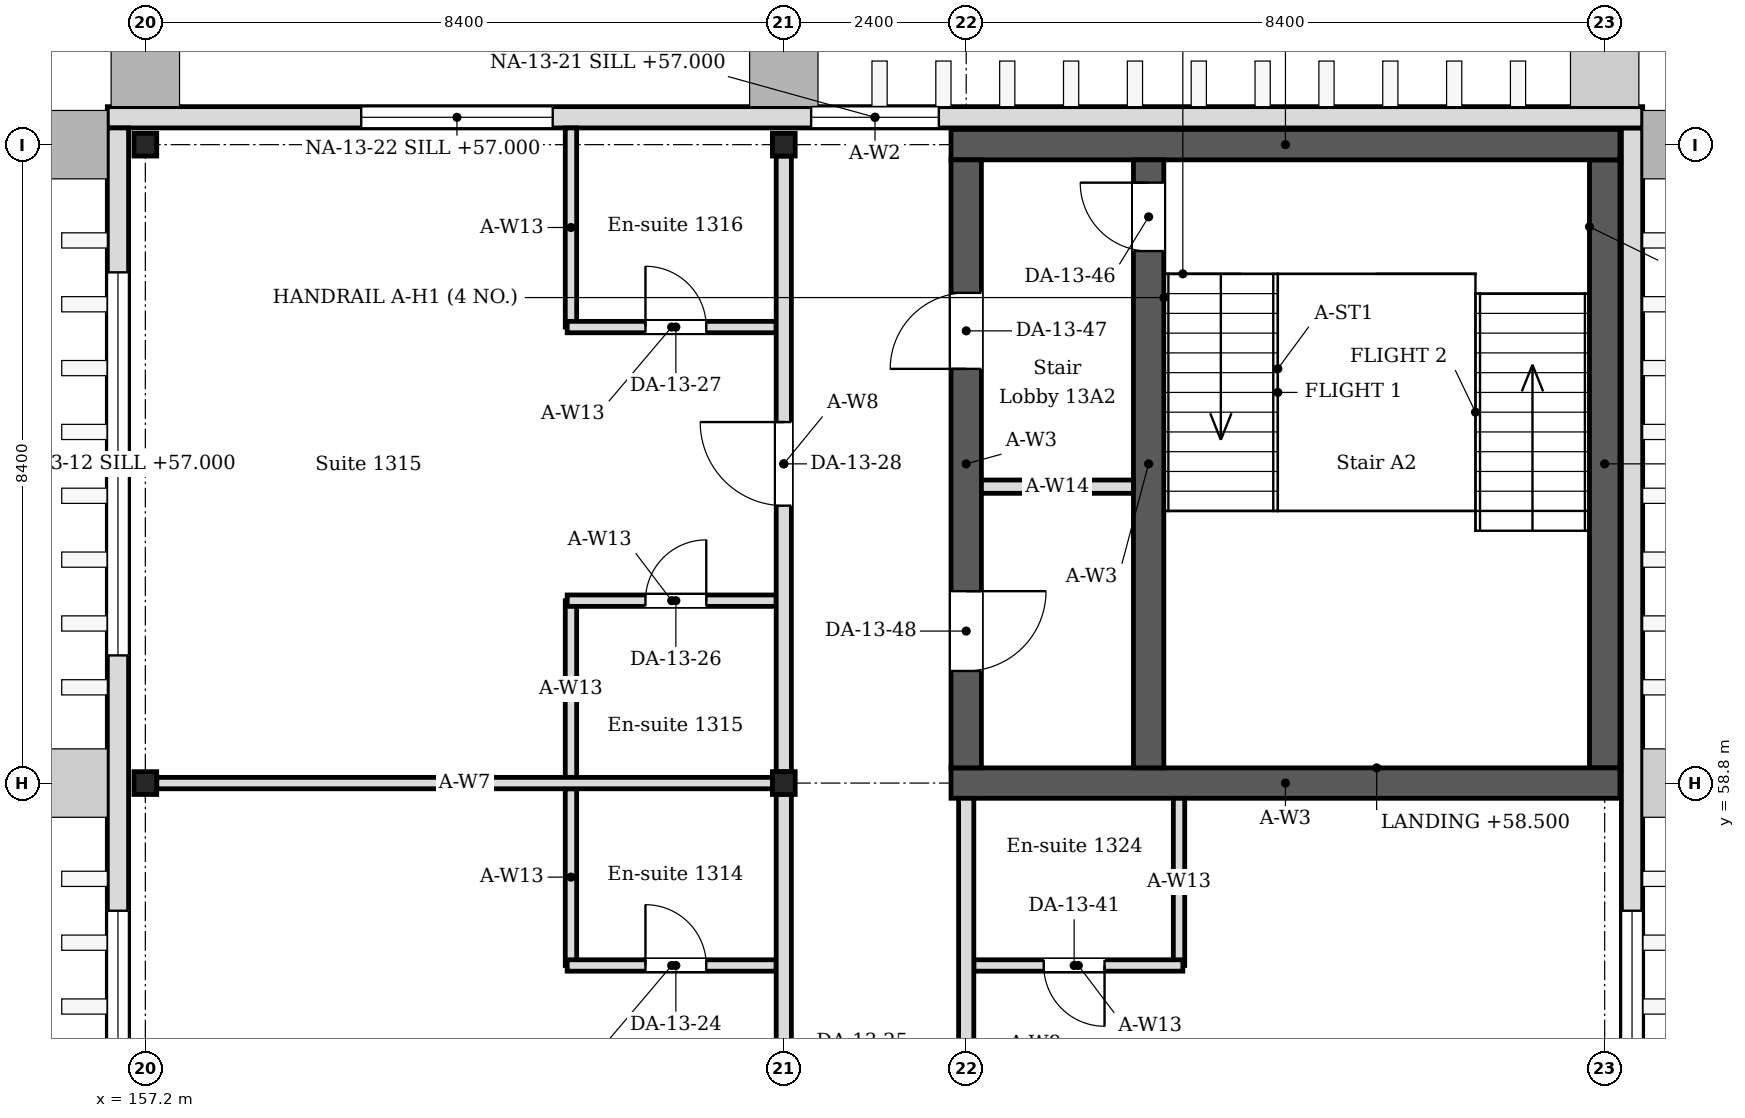
"""IFC4 building model, lengths in metres.
Left out: names, types, materials, properties, quantities, classifications, styles, units other than length and angle.
Written with IfcOpenShell. Run it as: python <this file> out.ifc"""

import sys

from ifc_helpers import new_model, si_unit, direction, frame, frame_2d, origin, origin_2d, place, context, subcontext, project, spatial, rectangle, i_section, extrude, element, fill, save


model = new_model("IFC4")
c1 = context("Model", 3, precision=1e-05, world=origin(), true_north=direction((0.0, 1.0)))
c2 = subcontext(c1, "Body", "Model", "MODEL_VIEW")
j1 = project(units=[si_unit("LENGTHUNIT", "METRE"), si_unit("PLANEANGLEUNIT", "RADIAN")], contexts=[c1])
p1 = place(None, origin())
s1 = spatial("IfcSite", under=j1, at=p1, CompositionType="ELEMENT")
p2 = place(p1, origin())
s2 = spatial("IfcBuilding", under=s1, at=p2, CompositionType="ELEMENT")
p3 = place(p2, frame((0.0, 0.0, 56.4)))
s3 = spatial("IfcBuildingStorey", under=s2, at=p3, CompositionType="ELEMENT", Elevation=56.4)
for number, where, z_axis, x_axis in (
    (1, (157.2, 58.8, 0.0), (0.0, 0.0, 1.0), (1.0, 0.0, 0.0)),
    (2, (157.2, 67.2, 0.0), (0.0, 0.0, 1.0), (1.0, 0.0, 0.0)),
    (3, (165.6, 58.8, 0.0), (0.0, 0.0, 1.0), (1.0, 0.0, 0.0)),
    (4, (165.6, 67.2, 0.0), (0.0, 0.0, 1.0), (1.0, 0.0, 0.0)),
):
    element("IfcColumn", number, at=place(p3, frame(where, z_axis=z_axis, x_axis=x_axis)), inside=s3, PredefinedType="COLUMN", context=c2, shape_type="SweptSolid", body=[
        extrude(i_section(OverallWidth=0.3, OverallDepth=0.3, WebThickness=0.01, FlangeThickness=0.015, FilletRadius=0.013, at=origin_2d()), origin(), (0.0, 0.0, 1.0), 4.2),
    ])
for number, where, z_axis, x_axis in (
    (5, (167.8, 58.8, 0.0), (0.0, 0.0, 1.0), (1.0, 0.0, 0.0)),
    (6, (167.8, 67.2, 0.0), (0.0, 0.0, 1.0), (1.0, 0.0, 0.0)),
):
    element("IfcWall", number, at=place(p3, frame(where, z_axis=z_axis, x_axis=x_axis)), inside=s3, PredefinedType="SOLIDWALL", context=c2, shape_type="SweptSolid", body=[
        extrude(rectangle(XDim=8.8, YDim=0.4, at=frame_2d((4.4, 0.0))), origin(), (0.0, 0.0, 1.0), 4.05),
    ])
p4 = place(p3, frame((168.0, 59.0, 0.0), z_axis=(0.0, 0.0, 1.0), x_axis=(0.0, 1.0, 0.0)))
e7 = element("IfcWall", 7, at=p4, inside=s3, PredefinedType="SOLIDWALL", context=c2, shape_type="SweptSolid", body=[
    extrude(rectangle(XDim=8.0, YDim=0.4, at=frame_2d((4.0, 0.0))), origin(), (0.0, 0.0, 1.0), 4.05),
])
p5 = place(p4, frame((5.25, 0.0, 0.0)))
e8 = element("IfcOpeningElement", 8, at=p5, cuts=e7, PredefinedType="OPENING", context=c2, shape_type="SweptSolid", body=[
    extrude(rectangle(XDim=1.0, YDim=2.1, at=frame_2d((0.5, 1.05))), frame((0.0, 0.21, 0.0), z_axis=(0.0, -1.0, 0.0), x_axis=(1.0, 0.0, 0.0)), (0.0, 0.0, 1.0), 0.42),
])
p6 = place(p4, frame((1.275, 0.0, 0.0)))
e9 = element("IfcOpeningElement", 9, at=p6, cuts=e7, PredefinedType="OPENING", context=c2, shape_type="SweptSolid", body=[
    extrude(rectangle(XDim=1.05, YDim=2.1, at=frame_2d((0.525, 1.05))), frame((0.0, 0.21, 0.0), z_axis=(0.0, -1.0, 0.0), x_axis=(1.0, 0.0, 0.0)), (0.0, 0.0, 1.0), 0.42),
])
p7 = place(p3, frame((176.4, 59.0, 0.0), z_axis=(0.0, 0.0, 1.0), x_axis=(0.0, 1.0, 0.0)))
e10 = element("IfcWall", 10, at=p7, inside=s3, PredefinedType="SOLIDWALL", context=c2, shape_type="SweptSolid", body=[
    extrude(rectangle(XDim=8.0, YDim=0.4, at=frame_2d((4.0, 0.0))), origin(), (0.0, 0.0, 1.0), 4.05),
])
p8 = place(p3, frame((156.84, 41.65, 0.0), z_axis=(0.0, 0.0, 1.0), x_axis=(0.0, 1.0, 0.0)))
e11 = element("IfcWall", 11, at=p8, inside=s3, PredefinedType="SOLIDWALL", context=c2, shape_type="SweptSolid", body=[
    extrude(rectangle(XDim=25.77, YDim=0.28, at=frame_2d((12.885, 0.0))), origin(), (0.0, 0.0, 1.0), 4.05),
])
p9 = place(p8, frame((2.03, 0.0, 0.6)))
e12 = element("IfcOpeningElement", 12, at=p9, cuts=e11, PredefinedType="OPENING", context=c2, shape_type="SweptSolid", body=[
    extrude(rectangle(XDim=5.04, YDim=2.4, at=frame_2d((2.52, 1.2))), frame((0.0, 0.15, 0.0), z_axis=(0.0, -1.0, 0.0), x_axis=(1.0, 0.0, 0.0)), (0.0, 0.0, 1.0), 0.3),
])
p10 = place(p8, frame((10.43, 0.0, 0.6)))
e13 = element("IfcOpeningElement", 13, at=p10, cuts=e11, PredefinedType="OPENING", context=c2, shape_type="SweptSolid", body=[
    extrude(rectangle(XDim=5.04, YDim=2.4, at=frame_2d((2.52, 1.2))), frame((0.0, 0.15, 0.0), z_axis=(0.0, -1.0, 0.0), x_axis=(1.0, 0.0, 0.0)), (0.0, 0.0, 1.0), 0.3),
])
p11 = place(p8, frame((18.83, 0.0, 0.6)))
e14 = element("IfcOpeningElement", 14, at=p11, cuts=e11, PredefinedType="OPENING", context=c2, shape_type="SweptSolid", body=[
    extrude(rectangle(XDim=5.04, YDim=2.4, at=frame_2d((2.52, 1.2))), frame((0.0, 0.15, 0.0), z_axis=(0.0, -1.0, 0.0), x_axis=(1.0, 0.0, 0.0)), (0.0, 0.0, 1.0), 0.3),
])
p12 = place(p3, frame((176.76, 24.85, 0.0), z_axis=(0.0, 0.0, 1.0), x_axis=(0.0, 1.0, 0.0)))
e15 = element("IfcWall", 15, at=p12, inside=s3, PredefinedType="SOLIDWALL", context=c2, shape_type="SweptSolid", body=[
    extrude(rectangle(XDim=42.57, YDim=0.28, at=frame_2d((21.285, 0.0))), origin(), (0.0, 0.0, 1.0), 4.05),
])
p13 = place(p12, frame((18.83, 0.0, 0.6)))
e16 = element("IfcOpeningElement", 16, at=p13, cuts=e15, PredefinedType="OPENING", context=c2, shape_type="SweptSolid", body=[
    extrude(rectangle(XDim=5.04, YDim=2.4, at=frame_2d((2.52, 1.2))), frame((0.0, 0.15, 0.0), z_axis=(0.0, -1.0, 0.0), x_axis=(1.0, 0.0, 0.0)), (0.0, 0.0, 1.0), 0.3),
])
p14 = place(p12, frame((27.23, 0.0, 0.6)))
e17 = element("IfcOpeningElement", 17, at=p14, cuts=e15, PredefinedType="OPENING", context=c2, shape_type="SweptSolid", body=[
    extrude(rectangle(XDim=5.04, YDim=2.4, at=frame_2d((2.52, 1.2))), frame((0.0, 0.15, 0.0), z_axis=(0.0, -1.0, 0.0), x_axis=(1.0, 0.0, 0.0)), (0.0, 0.0, 1.0), 0.3),
])
p15 = place(p3, frame((156.7, 67.56, 0.0), z_axis=(0.0, 0.0, 1.0), x_axis=(1.0, 0.0, 0.0)))
e18 = element("IfcWall", 18, at=p15, inside=s3, PredefinedType="SOLIDWALL", context=c2, shape_type="SweptSolid", body=[
    extrude(rectangle(XDim=20.2, YDim=0.28, at=frame_2d((10.1, 0.0))), origin(), (0.0, 0.0, 1.0), 4.05),
])
p16 = place(p15, frame((9.26, 0.0, 0.6)))
e19 = element("IfcOpeningElement", 19, at=p16, cuts=e18, PredefinedType="OPENING", context=c2, shape_type="SweptSolid", body=[
    extrude(rectangle(XDim=1.68, YDim=2.4, at=frame_2d((0.84, 1.2))), frame((0.0, 0.15, 0.0), z_axis=(0.0, -1.0, 0.0), x_axis=(1.0, 0.0, 0.0)), (0.0, 0.0, 1.0), 0.3),
])
p17 = place(p15, frame((3.34, 0.0, 0.6)))
e20 = element("IfcOpeningElement", 20, at=p17, cuts=e18, PredefinedType="OPENING", context=c2, shape_type="SweptSolid", body=[
    extrude(rectangle(XDim=2.52, YDim=2.4, at=frame_2d((1.26, 1.2))), frame((0.0, 0.15, 0.0), z_axis=(0.0, -1.0, 0.0), x_axis=(1.0, 0.0, 0.0)), (0.0, 0.0, 1.0), 0.3),
])
p18 = place(p3, frame((162.8, 56.4, 0.0), z_axis=(0.0, 0.0, 1.0), x_axis=(0.0, 1.0, 0.0)))
e21 = element("IfcWall", 21, at=p18, inside=s3, PredefinedType="PARTITIONING", context=c2, shape_type="SweptSolid", body=[
    extrude(rectangle(XDim=2.325, YDim=0.15, at=frame_2d((1.163, 0.0))), origin(), (0.0, 0.0, 1.0), 4.05),
])
p19 = place(p3, frame((162.75, 56.4, 0.0), z_axis=(0.0, 0.0, 1.0), x_axis=(1.0, 0.0, 0.0)))
e22 = element("IfcWall", 22, at=p19, inside=s3, PredefinedType="PARTITIONING", context=c2, shape_type="SweptSolid", body=[
    extrude(rectangle(XDim=2.75, YDim=0.15, at=frame_2d((1.375, 0.0))), origin(), (0.0, 0.0, 1.0), 4.05),
])
p20 = place(p19, frame((1.03, 0.0, 0.0)))
e23 = element("IfcOpeningElement", 23, at=p20, cuts=e22, PredefinedType="OPENING", context=c2, shape_type="SweptSolid", body=[
    extrude(rectangle(XDim=0.8, YDim=2.1, at=frame_2d((0.4, 1.05))), frame((0.0, 0.085, 0.0), z_axis=(0.0, -1.0, 0.0), x_axis=(1.0, 0.0, 0.0)), (0.0, 0.0, 1.0), 0.17),
])
p21 = place(p3, frame((162.8, 58.875, 0.0), z_axis=(0.0, 0.0, 1.0), x_axis=(0.0, 1.0, 0.0)))
e24 = element("IfcWall", 24, at=p21, inside=s3, PredefinedType="PARTITIONING", context=c2, shape_type="SweptSolid", body=[
    extrude(rectangle(XDim=2.325, YDim=0.15, at=frame_2d((1.163, 0.0))), origin(), (0.0, 0.0, 1.0), 4.05),
])
p22 = place(p3, frame((162.75, 61.2, 0.0), z_axis=(0.0, 0.0, 1.0), x_axis=(1.0, 0.0, 0.0)))
e25 = element("IfcWall", 25, at=p22, inside=s3, PredefinedType="PARTITIONING", context=c2, shape_type="SweptSolid", body=[
    extrude(rectangle(XDim=2.75, YDim=0.15, at=frame_2d((1.375, 0.0))), origin(), (0.0, 0.0, 1.0), 4.05),
])
p23 = place(p22, frame((1.03, 0.0, 0.0)))
e26 = element("IfcOpeningElement", 26, at=p23, cuts=e25, PredefinedType="OPENING", context=c2, shape_type="SweptSolid", body=[
    extrude(rectangle(XDim=0.8, YDim=2.1, at=frame_2d((0.4, 1.05))), frame((0.0, 0.085, 0.0), z_axis=(0.0, -1.0, 0.0), x_axis=(1.0, 0.0, 0.0)), (0.0, 0.0, 1.0), 0.17),
])
p24 = place(p3, frame((162.8, 64.8, 0.0), z_axis=(0.0, 0.0, 1.0), x_axis=(0.0, 1.0, 0.0)))
e27 = element("IfcWall", 27, at=p24, inside=s3, PredefinedType="PARTITIONING", context=c2, shape_type="SweptSolid", body=[
    extrude(rectangle(XDim=2.62, YDim=0.15, at=frame_2d((1.31, 0.0))), origin(), (0.0, 0.0, 1.0), 4.05),
])
p25 = place(p3, frame((162.75, 64.8, 0.0), z_axis=(0.0, 0.0, 1.0), x_axis=(1.0, 0.0, 0.0)))
e28 = element("IfcWall", 28, at=p25, inside=s3, PredefinedType="PARTITIONING", context=c2, shape_type="SweptSolid", body=[
    extrude(rectangle(XDim=2.75, YDim=0.15, at=frame_2d((1.375, 0.0))), origin(), (0.0, 0.0, 1.0), 4.05),
])
p26 = place(p25, frame((1.03, 0.0, 0.0)))
e29 = element("IfcOpeningElement", 29, at=p26, cuts=e28, PredefinedType="OPENING", context=c2, shape_type="SweptSolid", body=[
    extrude(rectangle(XDim=0.8, YDim=2.1, at=frame_2d((0.4, 1.05))), frame((0.0, 0.085, 0.0), z_axis=(0.0, -1.0, 0.0), x_axis=(1.0, 0.0, 0.0)), (0.0, 0.0, 1.0), 0.17),
])
p27 = place(p3, frame((170.8, 56.4, 0.0), z_axis=(0.0, 0.0, 1.0), x_axis=(0.0, 1.0, 0.0)))
e30 = element("IfcWall", 30, at=p27, inside=s3, PredefinedType="PARTITIONING", context=c2, shape_type="SweptSolid", body=[
    extrude(rectangle(XDim=2.2, YDim=0.15, at=frame_2d((1.1, 0.0))), origin(), (0.0, 0.0, 1.0), 4.05),
])
p28 = place(p3, frame((170.85, 56.4, 0.0), z_axis=(0.0, 0.0, 1.0), x_axis=(-1.0, 0.0, 0.0)))
e31 = element("IfcWall", 31, at=p28, inside=s3, PredefinedType="PARTITIONING", context=c2, shape_type="SweptSolid", body=[
    extrude(rectangle(XDim=2.75, YDim=0.15, at=frame_2d((1.375, 0.0))), origin(), (0.0, 0.0, 1.0), 4.05),
])
p29 = place(p28, frame((1.03, 0.0, 0.0)))
e32 = element("IfcOpeningElement", 32, at=p29, cuts=e31, PredefinedType="OPENING", context=c2, shape_type="SweptSolid", body=[
    extrude(rectangle(XDim=0.8, YDim=2.1, at=frame_2d((0.4, 1.05))), frame((0.0, 0.085, 0.0), z_axis=(0.0, -1.0, 0.0), x_axis=(1.0, 0.0, 0.0)), (0.0, 0.0, 1.0), 0.17),
])
p30 = place(p3, frame((157.35, 58.8, 0.0), z_axis=(0.0, 0.0, 1.0), x_axis=(1.0, 0.0, 0.0)))
e33 = element("IfcWall", 33, at=p30, inside=s3, PredefinedType="PARTITIONING", context=c2, shape_type="SweptSolid", body=[
    extrude(rectangle(XDim=8.1, YDim=0.15, at=frame_2d((4.05, 0.0))), origin(), (0.0, 0.0, 1.0), 3.604),
])
p31 = place(p3, frame((165.6, 50.55, 0.0), z_axis=(0.0, 0.0, 1.0), x_axis=(0.0, 1.0, 0.0)))
e34 = element("IfcWall", 34, at=p31, inside=s3, PredefinedType="PARTITIONING", context=c2, shape_type="SweptSolid", body=[
    extrude(rectangle(XDim=8.1, YDim=0.2, at=frame_2d((4.05, 0.0))), origin(), (0.0, 0.0, 1.0), 3.45),
])
p32 = place(p31, frame((3.5, 0.0, 0.0)))
e35 = element("IfcOpeningElement", 35, at=p32, cuts=e34, PredefinedType="OPENING", context=c2, shape_type="SweptSolid", body=[
    extrude(rectangle(XDim=1.1, YDim=2.4, at=frame_2d((0.55, 1.2))), frame((0.0, 0.11, 0.0), z_axis=(0.0, -1.0, 0.0), x_axis=(1.0, 0.0, 0.0)), (0.0, 0.0, 1.0), 0.22),
])
p33 = place(p3, frame((165.6, 58.95, 0.0), z_axis=(0.0, 0.0, 1.0), x_axis=(0.0, 1.0, 0.0)))
e36 = element("IfcWall", 36, at=p33, inside=s3, PredefinedType="PARTITIONING", context=c2, shape_type="SweptSolid", body=[
    extrude(rectangle(XDim=8.1, YDim=0.2, at=frame_2d((4.05, 0.0))), origin(), (0.0, 0.0, 1.0), 3.45),
])
p34 = place(p33, frame((3.5, 0.0, 0.0)))
e37 = element("IfcOpeningElement", 37, at=p34, cuts=e36, PredefinedType="OPENING", context=c2, shape_type="SweptSolid", body=[
    extrude(rectangle(XDim=1.1, YDim=2.4, at=frame_2d((0.55, 1.2))), frame((0.0, 0.11, 0.0), z_axis=(0.0, -1.0, 0.0), x_axis=(1.0, 0.0, 0.0)), (0.0, 0.0, 1.0), 0.22),
])
p35 = place(p3, frame((168.0, 50.55, 0.0), z_axis=(0.0, 0.0, 1.0), x_axis=(0.0, 1.0, 0.0)))
e38 = element("IfcWall", 38, at=p35, inside=s3, PredefinedType="PARTITIONING", context=c2, shape_type="SweptSolid", body=[
    extrude(rectangle(XDim=8.05, YDim=0.2, at=frame_2d((4.025, 0.0))), origin(), (0.0, 0.0, 1.0), 3.45),
])
p36 = place(p35, frame((3.5, 0.0, 0.0)))
e39 = element("IfcOpeningElement", 39, at=p36, cuts=e38, PredefinedType="OPENING", context=c2, shape_type="SweptSolid", body=[
    extrude(rectangle(XDim=1.1, YDim=2.4, at=frame_2d((0.55, 1.2))), frame((0.0, 0.11, 0.0), z_axis=(0.0, -1.0, 0.0), x_axis=(1.0, 0.0, 0.0)), (0.0, 0.0, 1.0), 0.22),
])
p37 = place(p3, frame((170.4, 59.0, 0.0), z_axis=(0.0, 0.0, 1.0), x_axis=(0.0, 1.0, 0.0)))
e40 = element("IfcWall", 40, at=p37, inside=s3, PredefinedType="SOLIDWALL", context=c2, shape_type="SweptSolid", body=[
    extrude(rectangle(XDim=8.0, YDim=0.4, at=frame_2d((4.0, 0.0))), origin(), (0.0, 0.0, 1.0), 4.05),
])
p38 = place(p37, frame((6.8, 0.0, 0.0)))
e41 = element("IfcOpeningElement", 41, at=p38, cuts=e40, PredefinedType="OPENING", context=c2, shape_type="SweptSolid", body=[
    extrude(rectangle(XDim=0.9, YDim=2.1, at=frame_2d((0.45, 1.05))), frame((0.0, 0.21, 0.0), z_axis=(0.0, -1.0, 0.0), x_axis=(1.0, 0.0, 0.0)), (0.0, 0.0, 1.0), 0.42),
])
p39 = place(p3, frame((168.2, 62.7, 0.0), z_axis=(0.0, 0.0, 1.0), x_axis=(1.0, 0.0, 0.0)))
e42 = element("IfcWall", 42, at=p39, inside=s3, PredefinedType="PARTITIONING", context=c2, shape_type="SweptSolid", body=[
    extrude(rectangle(XDim=2.0, YDim=0.175, at=frame_2d((1.0, 0.0))), origin(), (0.0, 0.0, 1.0), 4.05),
])
p40 = place(p10, origin())
e43 = element("IfcWindow", 43, at=p40, inside=s3, PartitioningType="SINGLE_PANEL", PredefinedType="WINDOW", context=c2, shape_type="SweptSolid", body=[
    extrude(rectangle(XDim=5.04, YDim=2.4, at=frame_2d((2.52, 1.2))), frame((0.0, 0.03, 0.0), z_axis=(0.0, -1.0, 0.0), x_axis=(1.0, 0.0, 0.0)), (0.0, 0.0, 1.0), 0.06),
])
fill(e13, e43)
p41 = place(p11, origin())
e44 = element("IfcWindow", 44, at=p41, inside=s3, PartitioningType="SINGLE_PANEL", PredefinedType="WINDOW", context=c2, shape_type="SweptSolid", body=[
    extrude(rectangle(XDim=5.04, YDim=2.4, at=frame_2d((2.52, 1.2))), frame((0.0, 0.03, 0.0), z_axis=(0.0, -1.0, 0.0), x_axis=(1.0, 0.0, 0.0)), (0.0, 0.0, 1.0), 0.06),
])
fill(e14, e44)
p42 = place(p14, origin())
e45 = element("IfcWindow", 45, at=p42, inside=s3, PartitioningType="SINGLE_PANEL", PredefinedType="WINDOW", context=c2, shape_type="SweptSolid", body=[
    extrude(rectangle(XDim=5.04, YDim=2.4, at=frame_2d((2.52, 1.2))), frame((0.0, 0.03, 0.0), z_axis=(0.0, -1.0, 0.0), x_axis=(1.0, 0.0, 0.0)), (0.0, 0.0, 1.0), 0.06),
])
fill(e17, e45)
p43 = place(p16, origin())
e46 = element("IfcWindow", 46, at=p43, inside=s3, PartitioningType="SINGLE_PANEL", PredefinedType="WINDOW", context=c2, shape_type="SweptSolid", body=[
    extrude(rectangle(XDim=1.68, YDim=2.4, at=frame_2d((0.84, 1.2))), frame((0.0, 0.03, 0.0), z_axis=(0.0, -1.0, 0.0), x_axis=(1.0, 0.0, 0.0)), (0.0, 0.0, 1.0), 0.06),
])
fill(e19, e46)
p44 = place(p17, origin())
e47 = element("IfcWindow", 47, at=p44, inside=s3, PartitioningType="SINGLE_PANEL", PredefinedType="WINDOW", context=c2, shape_type="SweptSolid", body=[
    extrude(rectangle(XDim=2.52, YDim=2.4, at=frame_2d((1.26, 1.2))), frame((0.0, 0.03, 0.0), z_axis=(0.0, -1.0, 0.0), x_axis=(1.0, 0.0, 0.0)), (0.0, 0.0, 1.0), 0.06),
])
fill(e20, e47)
p45 = place(p20, origin())
e48 = element("IfcDoor", 48, at=p45, inside=s3, OperationType="SINGLE_SWING_LEFT", PredefinedType="DOOR", context=c2, shape_type="SweptSolid", body=[
    extrude(rectangle(XDim=0.8, YDim=2.1, at=frame_2d((0.4, 1.05))), frame((0.0, 0.025, 0.0), z_axis=(0.0, -1.0, 0.0), x_axis=(1.0, 0.0, 0.0)), (0.0, 0.0, 1.0), 0.05),
])
fill(e23, e48)
p46 = place(p23, origin())
e49 = element("IfcDoor", 49, at=p46, inside=s3, OperationType="SINGLE_SWING_RIGHT", PredefinedType="DOOR", context=c2, shape_type="SweptSolid", body=[
    extrude(rectangle(XDim=0.8, YDim=2.1, at=frame_2d((0.4, 1.05))), frame((0.0, 0.025, 0.0), z_axis=(0.0, -1.0, 0.0), x_axis=(1.0, 0.0, 0.0)), (0.0, 0.0, 1.0), 0.05),
])
fill(e26, e49)
p47 = place(p26, origin())
e50 = element("IfcDoor", 50, at=p47, inside=s3, OperationType="SINGLE_SWING_LEFT", PredefinedType="DOOR", context=c2, shape_type="SweptSolid", body=[
    extrude(rectangle(XDim=0.8, YDim=2.1, at=frame_2d((0.4, 1.05))), frame((0.0, 0.025, 0.0), z_axis=(0.0, -1.0, 0.0), x_axis=(1.0, 0.0, 0.0)), (0.0, 0.0, 1.0), 0.05),
])
fill(e29, e50)
p48 = place(p34, origin())
e51 = element("IfcDoor", 51, at=p48, inside=s3, OperationType="SINGLE_SWING_RIGHT", PredefinedType="DOOR", context=c2, shape_type="SweptSolid", body=[
    extrude(rectangle(XDim=1.1, YDim=2.4, at=frame_2d((0.55, 1.2))), frame((0.0, 0.025, 0.0), z_axis=(0.0, -1.0, 0.0), x_axis=(1.0, 0.0, 0.0)), (0.0, 0.0, 1.0), 0.05),
])
fill(e37, e51)
p49 = place(p29, origin())
e52 = element("IfcDoor", 52, at=p49, inside=s3, OperationType="SINGLE_SWING_LEFT", PredefinedType="DOOR", context=c2, shape_type="SweptSolid", body=[
    extrude(rectangle(XDim=0.8, YDim=2.1, at=frame_2d((0.4, 1.05))), frame((0.0, 0.025, 0.0), z_axis=(0.0, -1.0, 0.0), x_axis=(1.0, 0.0, 0.0)), (0.0, 0.0, 1.0), 0.05),
])
fill(e32, e52)
p50 = place(p38, origin())
e53 = element("IfcDoor", 53, at=p50, inside=s3, OperationType="SINGLE_SWING_RIGHT", PredefinedType="DOOR", context=c2, shape_type="SweptSolid", body=[
    extrude(rectangle(XDim=0.9, YDim=2.1, at=frame_2d((0.45, 1.05))), frame((0.0, 0.025, 0.0), z_axis=(0.0, -1.0, 0.0), x_axis=(1.0, 0.0, 0.0)), (0.0, 0.0, 1.0), 0.05),
])
fill(e41, e53)
p51 = place(p5, origin())
e54 = element("IfcDoor", 54, at=p51, inside=s3, OperationType="SINGLE_SWING_LEFT", PredefinedType="DOOR", context=c2, shape_type="SweptSolid", body=[
    extrude(rectangle(XDim=1.0, YDim=2.1, at=frame_2d((0.5, 1.05))), frame((0.0, 0.025, 0.0), z_axis=(0.0, -1.0, 0.0), x_axis=(1.0, 0.0, 0.0)), (0.0, 0.0, 1.0), 0.05),
])
fill(e8, e54)
p52 = place(p6, origin())
e55 = element("IfcDoor", 55, at=p52, inside=s3, OperationType="SINGLE_SWING_RIGHT", PredefinedType="DOOR", context=c2, shape_type="SweptSolid", body=[
    extrude(rectangle(XDim=1.05, YDim=2.1, at=frame_2d((0.525, 1.05))), frame((0.0, 0.025, 0.0), z_axis=(0.0, -1.0, 0.0), x_axis=(1.0, 0.0, 0.0)), (0.0, 0.0, 1.0), 0.05),
])
fill(e9, e55)
save(model, sys.argv[1])
